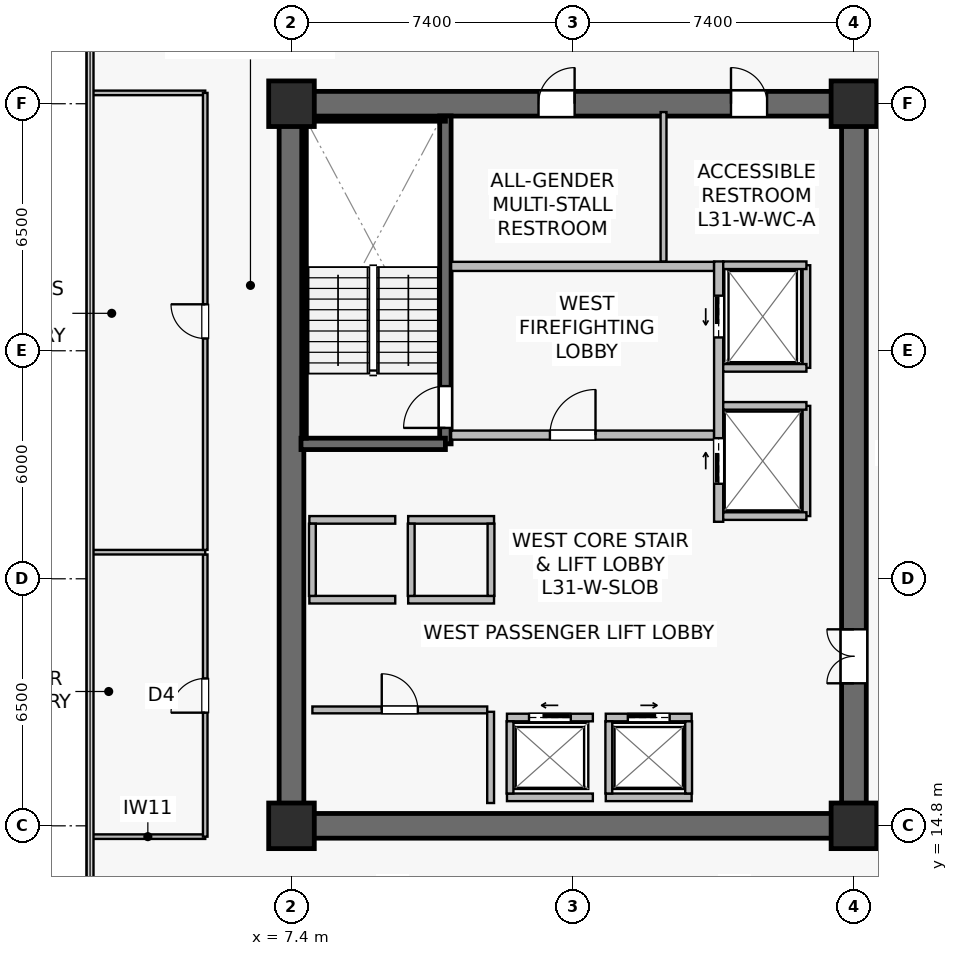
"""IFC4 building model, lengths in metres.
Left out: names, types, materials, properties, quantities, classifications, styles, units other than length and angle.
Written with IfcOpenShell. Run it as: python <this file> out.ifc"""

import sys

from ifc_helpers import new_model, si_unit, direction, frame, frame_2d, origin, origin_2d, place, context, subcontext, project, spatial, rectangle, extrude, source, transform, mapped, element, fill, save


model = new_model("IFC4")
c1 = context("Model", 3, precision=1e-05, world=origin(), true_north=direction((0.0, 1.0)))
c2 = subcontext(c1, "Body", "Model", "MODEL_VIEW")
j1 = project(units=[si_unit("LENGTHUNIT", "METRE"), si_unit("PLANEANGLEUNIT", "RADIAN")], contexts=[c1])
p1 = place(None, origin())
s1 = spatial("IfcSite", under=j1, at=p1, CompositionType="ELEMENT")
p2 = place(p1, origin())
s2 = spatial("IfcBuilding", under=s1, at=p2, CompositionType="ELEMENT")
p3 = place(p2, frame((0.0, 0.0, 129.7)))
s3 = spatial("IfcBuildingStorey", under=s2, at=p3, CompositionType="ELEMENT", Elevation=129.7)
p4 = place(p3, frame((7.075, 14.8, 0.0), z_axis=(0.0, 0.0, 1.0), x_axis=(1.0, 0.0, 0.0)))
e1 = element("IfcWall", 1, at=p4, inside=s3, PredefinedType="SHEAR", context=c2, shape_type="SweptSolid", body=[
    extrude(rectangle(XDim=15.45, YDim=0.65, at=frame_2d((7.725, 0.0))), origin(), (0.0, 0.0, 1.0), 3.79),
])
p5 = place(p3, frame((7.075, 33.8, 0.0), z_axis=(0.0, 0.0, 1.0), x_axis=(1.0, 0.0, 0.0)))
e2 = element("IfcWall", 2, at=p5, inside=s3, PredefinedType="SHEAR", context=c2, shape_type="SweptSolid", body=[
    extrude(rectangle(XDim=15.45, YDim=0.65, at=frame_2d((7.725, 0.0))), origin(), (0.0, 0.0, 1.0), 3.79),
])
p6 = place(p5, frame((6.825, 0.0, 0.0)))
e3 = element("IfcOpeningElement", 3, at=p6, cuts=e2, PredefinedType="OPENING", context=c2, shape_type="SweptSolid", body=[
    extrude(rectangle(XDim=0.95, YDim=2.15, at=frame_2d((0.475, 1.075))), frame((0.0, 0.335, 0.0), z_axis=(0.0, -1.0, 0.0), x_axis=(1.0, 0.0, 0.0)), (0.0, 0.0, 1.0), 0.67),
])
p7 = place(p5, frame((11.89, 0.0, 0.0)))
e4 = element("IfcOpeningElement", 4, at=p7, cuts=e2, PredefinedType="OPENING", context=c2, shape_type="SweptSolid", body=[
    extrude(rectangle(XDim=0.95, YDim=2.15, at=frame_2d((0.475, 1.075))), frame((0.0, 0.335, 0.0), z_axis=(0.0, -1.0, 0.0), x_axis=(1.0, 0.0, 0.0)), (0.0, 0.0, 1.0), 0.67),
])
p8 = place(p3, frame((7.4, 15.125, 0.0), z_axis=(0.0, 0.0, 1.0), x_axis=(0.0, 1.0, 0.0)))
e5 = element("IfcWall", 5, at=p8, inside=s3, PredefinedType="SHEAR", context=c2, shape_type="SweptSolid", body=[
    extrude(rectangle(XDim=18.35, YDim=0.65, at=frame_2d((9.175, 0.0))), origin(), (0.0, 0.0, 1.0), 3.79),
])
p9 = place(p3, frame((22.2, 15.125, 0.0), z_axis=(0.0, 0.0, 1.0), x_axis=(0.0, 1.0, 0.0)))
e6 = element("IfcWall", 6, at=p9, inside=s3, PredefinedType="SHEAR", context=c2, shape_type="SweptSolid", body=[
    extrude(rectangle(XDim=18.35, YDim=0.65, at=frame_2d((9.175, 0.0))), origin(), (0.0, 0.0, 1.0), 3.79),
])
p10 = place(p9, frame((3.425, 0.0, 0.0)))
e7 = element("IfcOpeningElement", 7, at=p10, cuts=e6, PredefinedType="OPENING", context=c2, shape_type="SweptSolid", body=[
    extrude(rectangle(XDim=1.42, YDim=2.2, at=frame_2d((0.71, 1.1))), frame((0.0, 0.335, 0.0), z_axis=(0.0, -1.0, 0.0), x_axis=(1.0, 0.0, 0.0)), (0.0, 0.0, 1.0), 0.67),
])
p11 = place(p3, frame((11.45, 24.85, 0.0), z_axis=(0.0, 0.0, 1.0), x_axis=(0.0, 1.0, 0.0)))
e8 = element("IfcWall", 8, at=p11, inside=s3, PredefinedType="SHEAR", context=c2, shape_type="SweptSolid", body=[
    extrude(rectangle(XDim=8.63, YDim=0.3, at=frame_2d((4.315, 0.0))), origin(), (0.0, 0.0, 1.0), 3.79),
])
p12 = place(p11, frame((0.42, 0.0, 0.0)))
e9 = element("IfcOpeningElement", 9, at=p12, cuts=e8, PredefinedType="OPENING", context=c2, shape_type="SweptSolid", body=[
    extrude(rectangle(XDim=1.1, YDim=2.15, at=frame_2d((0.55, 1.075))), frame((0.0, 0.16, 0.0), z_axis=(0.0, -1.0, 0.0), x_axis=(1.0, 0.0, 0.0)), (0.0, 0.0, 1.0), 0.32),
])
p13 = place(p3, frame((7.65, 24.85, 0.0), z_axis=(0.0, 0.0, 1.0), x_axis=(1.0, 0.0, 0.0)))
e10 = element("IfcWall", 10, at=p13, inside=s3, PredefinedType="SHEAR", context=c2, shape_type="SweptSolid", body=[
    extrude(rectangle(XDim=3.8, YDim=0.3, at=frame_2d((1.9, 0.0))), origin(), (0.0, 0.0, 1.0), 3.79),
])
p14 = place(p3, frame((7.73, 33.4, 0.0), z_axis=(0.0, 0.0, 1.0), x_axis=(1.0, 0.0, 0.0)))
e11 = element("IfcWall", 11, at=p14, inside=s3, PredefinedType="SOLIDWALL", context=c2, shape_type="SweptSolid", body=[
    extrude(rectangle(XDim=3.72, YDim=0.12, at=frame_2d((1.86, 0.0))), origin(), (0.0, 0.0, 1.0), 3.79),
])
p15 = place(p3, frame((7.73, 25.0, 0.0), z_axis=(0.0, 0.0, 1.0), x_axis=(0.0, 1.0, 0.0)))
e12 = element("IfcWall", 12, at=p15, inside=s3, PredefinedType="SOLIDWALL", context=c2, shape_type="SweptSolid", body=[
    extrude(rectangle(XDim=8.32, YDim=0.12, at=frame_2d((4.16, 0.0))), origin(), (0.0, 0.0, 1.0), 3.79),
])
m1 = source(origin(), c2, "Body", "SweptSolid", [
    extrude(rectangle(XDim=1.2, YDim=1.2, at=origin_2d()), origin(), (0.0, 0.0, 1.0), 4.1),
])
for number, where, z_axis, x_axis in (
    (13, (7.4, 14.8, 0.0), (0.0, 0.0, 1.0), (1.0, 0.0, 0.0)),
    (14, (22.2, 14.8, 0.0), (0.0, 0.0, 1.0), (1.0, 0.0, 0.0)),
    (15, (7.4, 33.8, 0.0), (0.0, 0.0, 1.0), (1.0, 0.0, 0.0)),
    (16, (22.2, 33.8, 0.0), (0.0, 0.0, 1.0), (1.0, 0.0, 0.0)),
):
    element("IfcColumn", number, at=place(p3, frame(where, z_axis=z_axis, x_axis=x_axis)), inside=s3, PredefinedType="COLUMN", context=c2, shape_type="MappedRepresentation", body=[
        mapped(m1, transform((0.0, 0.0, 0.0), scale=1.0)),
    ])
p16 = place(p3, frame((11.6, 25.08, 0.0), z_axis=(0.0, 0.0, 1.0), x_axis=(1.0, 0.0, 0.0)))
e17 = element("IfcWall", 17, at=p16, inside=s3, PredefinedType="SOLIDWALL", context=c2, shape_type="SweptSolid", body=[
    extrude(rectangle(XDim=6.92, YDim=0.24, at=frame_2d((3.46, 0.0))), origin(), (0.0, 0.0, 1.0), 3.125),
])
p17 = place(p16, frame((2.6, 0.0, 0.0)))
e18 = element("IfcOpeningElement", 18, at=p17, cuts=e17, PredefinedType="OPENING", context=c2, shape_type="SweptSolid", body=[
    extrude(rectangle(XDim=1.2, YDim=2.16, at=frame_2d((0.6, 1.08))), frame((0.0, 0.13, 0.0), z_axis=(0.0, -1.0, 0.0), x_axis=(1.0, 0.0, 0.0)), (0.0, 0.0, 1.0), 0.26),
])
p18 = place(p3, frame((11.6, 29.52, 0.0), z_axis=(0.0, 0.0, 1.0), x_axis=(1.0, 0.0, 0.0)))
e19 = element("IfcWall", 19, at=p18, inside=s3, PredefinedType="SOLIDWALL", context=c2, shape_type="SweptSolid", body=[
    extrude(rectangle(XDim=6.92, YDim=0.24, at=frame_2d((3.46, 0.0))), origin(), (0.0, 0.0, 1.0), 3.125),
])
p19 = place(p3, frame((18.64, 22.8, 0.0), z_axis=(0.0, 0.0, 1.0), x_axis=(0.0, 1.0, 0.0)))
e20 = element("IfcWall", 20, at=p19, inside=s3, PredefinedType="SOLIDWALL", context=c2, shape_type="SweptSolid", body=[
    extrude(rectangle(XDim=6.85, YDim=0.24, at=frame_2d((3.425, 0.0))), origin(), (0.0, 0.0, 1.0), 2.875),
])
p20 = place(p19, frame((4.85, 0.0, 0.0)))
e21 = element("IfcOpeningElement", 21, at=p20, cuts=e20, PredefinedType="OPENING", context=c2, shape_type="SweptSolid", body=[
    extrude(rectangle(XDim=1.1, YDim=2.22, at=frame_2d((0.55, 1.11))), frame((0.0, 0.13, 0.0), z_axis=(0.0, -1.0, 0.0), x_axis=(1.0, 0.0, 0.0)), (0.0, 0.0, 1.0), 0.26),
])
p21 = place(p19, frame((1.0, 0.0, 0.0)))
e22 = element("IfcOpeningElement", 22, at=p21, cuts=e20, PredefinedType="OPENING", context=c2, shape_type="SweptSolid", body=[
    extrude(rectangle(XDim=1.2, YDim=2.22, at=frame_2d((0.6, 1.11))), frame((0.0, 0.13, 0.0), z_axis=(0.0, -1.0, 0.0), x_axis=(1.0, 0.0, 0.0)), (0.0, 0.0, 1.0), 0.26),
])
p22 = place(p3, frame((13.07, 17.65, 0.0), z_axis=(0.0, 0.0, 1.0), x_axis=(1.0, 0.0, 0.0)))
e23 = element("IfcWall", 23, at=p22, inside=s3, PredefinedType="SOLIDWALL", context=c2, shape_type="SweptSolid", body=[
    extrude(rectangle(XDim=2.26, YDim=0.2, at=frame_2d((1.13, 0.0))), origin(), (0.0, 0.0, 1.0), 3.125),
])
p23 = place(p22, frame((0.58, 0.0, 0.0)))
e24 = element("IfcOpeningElement", 24, at=p23, cuts=e23, PredefinedType="OPENING", context=c2, shape_type="SweptSolid", body=[
    extrude(rectangle(XDim=1.1, YDim=2.22, at=frame_2d((0.55, 1.11))), frame((0.0, 0.11, 0.0), z_axis=(0.0, -1.0, 0.0), x_axis=(1.0, 0.0, 0.0)), (0.0, 0.0, 1.0), 0.22),
])
p24 = place(p3, frame((13.07, 15.55, 0.0), z_axis=(0.0, 0.0, 1.0), x_axis=(1.0, 0.0, 0.0)))
e25 = element("IfcWall", 25, at=p24, inside=s3, PredefinedType="SOLIDWALL", context=c2, shape_type="SweptSolid", body=[
    extrude(rectangle(XDim=2.26, YDim=0.2, at=frame_2d((1.13, 0.0))), origin(), (0.0, 0.0, 1.0), 3.125),
])
p25 = place(p3, frame((13.15, 15.65, 0.0), z_axis=(0.0, 0.0, 1.0), x_axis=(0.0, 1.0, 0.0)))
e26 = element("IfcWall", 26, at=p25, inside=s3, PredefinedType="SOLIDWALL", context=c2, shape_type="SweptSolid", body=[
    extrude(rectangle(XDim=1.9, YDim=0.18, at=frame_2d((0.95, 0.0))), origin(), (0.0, 0.0, 1.0), 3.79),
])
p26 = place(p3, frame((15.67, 17.65, 0.0), z_axis=(0.0, 0.0, 1.0), x_axis=(1.0, 0.0, 0.0)))
e27 = element("IfcWall", 27, at=p26, inside=s3, PredefinedType="SOLIDWALL", context=c2, shape_type="SweptSolid", body=[
    extrude(rectangle(XDim=2.26, YDim=0.2, at=frame_2d((1.13, 0.0))), origin(), (0.0, 0.0, 1.0), 3.79),
])
p27 = place(p26, frame((0.58, 0.0, 0.0)))
e28 = element("IfcOpeningElement", 28, at=p27, cuts=e27, PredefinedType="OPENING", context=c2, shape_type="SweptSolid", body=[
    extrude(rectangle(XDim=1.1, YDim=2.22, at=frame_2d((0.55, 1.11))), frame((0.0, 0.11, 0.0), z_axis=(0.0, -1.0, 0.0), x_axis=(1.0, 0.0, 0.0)), (0.0, 0.0, 1.0), 0.22),
])
p28 = place(p3, frame((15.67, 15.55, 0.0), z_axis=(0.0, 0.0, 1.0), x_axis=(1.0, 0.0, 0.0)))
e29 = element("IfcWall", 29, at=p28, inside=s3, PredefinedType="SOLIDWALL", context=c2, shape_type="SweptSolid", body=[
    extrude(rectangle(XDim=2.26, YDim=0.2, at=frame_2d((1.13, 0.0))), origin(), (0.0, 0.0, 1.0), 3.79),
])
for number, where, z_axis, x_axis in (
    (30, (15.75, 15.65, 0.0), (0.0, 0.0, 1.0), (0.0, 1.0, 0.0)),
    (31, (17.85, 15.65, 0.0), (0.0, 0.0, 1.0), (0.0, 1.0, 0.0)),
):
    element("IfcWall", number, at=place(p3, frame(where, z_axis=z_axis, x_axis=x_axis)), inside=s3, PredefinedType="SOLIDWALL", context=c2, shape_type="SweptSolid", body=[
        extrude(rectangle(XDim=1.9, YDim=0.18, at=frame_2d((0.95, 0.0))), origin(), (0.0, 0.0, 1.0), 3.79),
    ])
for number, where, z_axis, x_axis in (
    (32, (7.87, 20.75, 0.0), (0.0, 0.0, 1.0), (1.0, 0.0, 0.0)),
    (33, (7.87, 22.85, 0.0), (0.0, 0.0, 1.0), (1.0, 0.0, 0.0)),
):
    element("IfcWall", number, at=place(p3, frame(where, z_axis=z_axis, x_axis=x_axis)), inside=s3, PredefinedType="SOLIDWALL", context=c2, shape_type="SweptSolid", body=[
        extrude(rectangle(XDim=2.26, YDim=0.2, at=frame_2d((1.13, 0.0))), origin(), (0.0, 0.0, 1.0), 3.79),
    ])
p29 = place(p3, frame((7.95, 20.85, 0.0), z_axis=(0.0, 0.0, 1.0), x_axis=(0.0, 1.0, 0.0)))
e34 = element("IfcWall", 34, at=p29, inside=s3, PredefinedType="SOLIDWALL", context=c2, shape_type="SweptSolid", body=[
    extrude(rectangle(XDim=1.9, YDim=0.18, at=frame_2d((0.95, 0.0))), origin(), (0.0, 0.0, 1.0), 3.79),
])
for number, where, z_axis, x_axis in (
    (35, (10.47, 20.75, 0.0), (0.0, 0.0, 1.0), (1.0, 0.0, 0.0)),
    (36, (10.47, 22.85, 0.0), (0.0, 0.0, 1.0), (1.0, 0.0, 0.0)),
):
    element("IfcWall", number, at=place(p3, frame(where, z_axis=z_axis, x_axis=x_axis)), inside=s3, PredefinedType="SOLIDWALL", context=c2, shape_type="SweptSolid", body=[
        extrude(rectangle(XDim=2.26, YDim=0.2, at=frame_2d((1.13, 0.0))), origin(), (0.0, 0.0, 1.0), 3.79),
    ])
for number, where, z_axis, x_axis in (
    (37, (10.55, 20.85, 0.0), (0.0, 0.0, 1.0), (0.0, 1.0, 0.0)),
    (38, (12.65, 20.85, 0.0), (0.0, 0.0, 1.0), (0.0, 1.0, 0.0)),
):
    element("IfcWall", number, at=place(p3, frame(where, z_axis=z_axis, x_axis=x_axis)), inside=s3, PredefinedType="SOLIDWALL", context=c2, shape_type="SweptSolid", body=[
        extrude(rectangle(XDim=1.9, YDim=0.18, at=frame_2d((0.95, 0.0))), origin(), (0.0, 0.0, 1.0), 3.79),
    ])
p30 = place(p3, frame((20.95, 26.85, 0.0), z_axis=(0.0, 0.0, 1.0), x_axis=(0.0, 1.0, 0.0)))
e39 = element("IfcWall", 39, at=p30, inside=s3, PredefinedType="SOLIDWALL", context=c2, shape_type="SweptSolid", body=[
    extrude(rectangle(XDim=2.7, YDim=0.2, at=frame_2d((1.35, 0.0))), origin(), (0.0, 0.0, 1.0), 3.79),
])
p31 = place(p3, frame((18.76, 29.55, 0.0), z_axis=(0.0, 0.0, 1.0), x_axis=(1.0, 0.0, 0.0)))
e40 = element("IfcWall", 40, at=p31, inside=s3, PredefinedType="SOLIDWALL", context=c2, shape_type="SweptSolid", body=[
    extrude(rectangle(XDim=2.19, YDim=0.2, at=frame_2d((1.095, 0.0))), origin(), (0.0, 0.0, 1.0), 3.79),
])
p32 = place(p3, frame((18.76, 26.85, 0.0), z_axis=(0.0, 0.0, 1.0), x_axis=(1.0, 0.0, 0.0)))
e41 = element("IfcWall", 41, at=p32, inside=s3, PredefinedType="SOLIDWALL", context=c2, shape_type="SweptSolid", body=[
    extrude(rectangle(XDim=2.19, YDim=0.2, at=frame_2d((1.095, 0.0))), origin(), (0.0, 0.0, 1.0), 3.187),
])
p33 = place(p3, frame((20.95, 22.95, 0.0), z_axis=(0.0, 0.0, 1.0), x_axis=(0.0, 1.0, 0.0)))
e42 = element("IfcWall", 42, at=p33, inside=s3, PredefinedType="SOLIDWALL", context=c2, shape_type="SweptSolid", body=[
    extrude(rectangle(XDim=2.9, YDim=0.2, at=frame_2d((1.45, 0.0))), origin(), (0.0, 0.0, 1.0), 2.875),
])
for number, where, z_axis, x_axis in (
    (43, (18.76, 25.85, 0.0), (0.0, 0.0, 1.0), (1.0, 0.0, 0.0)),
    (44, (18.76, 22.95, 0.0), (0.0, 0.0, 1.0), (1.0, 0.0, 0.0)),
):
    element("IfcWall", number, at=place(p3, frame(where, z_axis=z_axis, x_axis=x_axis)), inside=s3, PredefinedType="SOLIDWALL", context=c2, shape_type="SweptSolid", body=[
        extrude(rectangle(XDim=2.19, YDim=0.2, at=frame_2d((1.095, 0.0))), origin(), (0.0, 0.0, 1.0), 3.79),
    ])
p34 = place(p3, frame((7.95, 17.85, 0.0), z_axis=(0.0, 0.0, 1.0), x_axis=(1.0, 0.0, 0.0)))
e45 = element("IfcWall", 45, at=p34, inside=s3, PredefinedType="SOLIDWALL", context=c2, shape_type="SweptSolid", body=[
    extrude(rectangle(XDim=4.6, YDim=0.18, at=frame_2d((2.3, 0.0))), origin(), (0.0, 0.0, 1.0), 3.79),
])
p35 = place(p34, frame((1.825, 0.0, 0.0)))
e46 = element("IfcOpeningElement", 46, at=p35, cuts=e45, PredefinedType="OPENING", context=c2, shape_type="SweptSolid", body=[
    extrude(rectangle(XDim=0.95, YDim=2.15, at=frame_2d((0.475, 1.075))), frame((0.0, 0.1, 0.0), z_axis=(0.0, -1.0, 0.0), x_axis=(1.0, 0.0, 0.0)), (0.0, 0.0, 1.0), 0.2),
])
p36 = place(p3, frame((12.64, 15.4, 0.0), z_axis=(0.0, 0.0, 1.0), x_axis=(0.0, 1.0, 0.0)))
e47 = element("IfcWall", 47, at=p36, inside=s3, PredefinedType="SOLIDWALL", context=c2, shape_type="SweptSolid", body=[
    extrude(rectangle(XDim=2.4, YDim=0.18, at=frame_2d((1.2, 0.0))), origin(), (0.0, 0.0, 1.0), 3.79),
])
p37 = place(p3, frame((17.19, 29.65, 0.0), z_axis=(0.0, 0.0, 1.0), x_axis=(0.0, 1.0, 0.0)))
e48 = element("IfcWall", 48, at=p37, inside=s3, PredefinedType="PLUMBINGWALL", context=c2, shape_type="SweptSolid", body=[
    extrude(rectangle(XDim=3.93, YDim=0.155, at=frame_2d((1.965, 0.0))), origin(), (0.0, 0.0, 1.0), 3.79),
])
for number, where, z_axis, x_axis in (
    (49, (2.11, 14.515, 0.0), (0.0, 0.0, 1.0), (1.0, 0.0, 0.0)),
    (50, (2.11, 34.085, 0.0), (0.0, 0.0, 1.0), (1.0, 0.0, 0.0)),
):
    element("IfcWall", number, at=place(p3, frame(where, z_axis=z_axis, x_axis=x_axis)), inside=s3, PredefinedType="PARTITIONING", context=c2, shape_type="SweptSolid", body=[
        extrude(rectangle(XDim=3.02, YDim=0.12, at=frame_2d((1.51, 0.0))), origin(), (0.0, 0.0, 1.0), 3.79),
    ])
p38 = place(p3, frame((5.13, 14.515, 0.0), z_axis=(0.0, 0.0, 1.0), x_axis=(0.0, 1.0, 0.0)))
e51 = element("IfcWall", 51, at=p38, inside=s3, PredefinedType="PARTITIONING", context=c2, shape_type="SweptSolid", body=[
    extrude(rectangle(XDim=7.425, YDim=0.12, at=frame_2d((3.712, 0.0))), origin(), (0.0, 0.0, 1.0), 3.79),
])
p39 = place(p38, frame((3.262, 0.0, 0.0)))
e52 = element("IfcOpeningElement", 52, at=p39, cuts=e51, PredefinedType="OPENING", context=c2, shape_type="SweptSolid", body=[
    extrude(rectangle(XDim=0.9, YDim=2.1, at=frame_2d((0.45, 1.05))), frame((0.0, 0.07, 0.0), z_axis=(0.0, -1.0, 0.0), x_axis=(1.0, 0.0, 0.0)), (0.0, 0.0, 1.0), 0.14),
])
p40 = place(p3, frame((2.11, 22.0, 0.0), z_axis=(0.0, 0.0, 1.0), x_axis=(1.0, 0.0, 0.0)))
e53 = element("IfcWall", 53, at=p40, inside=s3, PredefinedType="PARTITIONING", context=c2, shape_type="SweptSolid", body=[
    extrude(rectangle(XDim=3.02, YDim=0.12, at=frame_2d((1.51, 0.0))), origin(), (0.0, 0.0, 1.0), 3.79),
])
p41 = place(p3, frame((5.13, 22.06, 0.0), z_axis=(0.0, 0.0, 1.0), x_axis=(0.0, 1.0, 0.0)))
e54 = element("IfcWall", 54, at=p41, inside=s3, PredefinedType="PARTITIONING", context=c2, shape_type="SweptSolid", body=[
    extrude(rectangle(XDim=12.025, YDim=0.12, at=frame_2d((6.012, 0.0))), origin(), (0.0, 0.0, 1.0), 3.79),
])
p42 = place(p41, frame((5.562, 0.0, 0.0)))
e55 = element("IfcOpeningElement", 55, at=p42, cuts=e54, PredefinedType="OPENING", context=c2, shape_type="SweptSolid", body=[
    extrude(rectangle(XDim=0.9, YDim=2.1, at=frame_2d((0.45, 1.05))), frame((0.0, 0.07, 0.0), z_axis=(0.0, -1.0, 0.0), x_axis=(1.0, 0.0, 0.0)), (0.0, 0.0, 1.0), 0.14),
])
m2 = source(origin(), c2, "Body", "SweptSolid", [
    extrude(rectangle(XDim=1.1, YDim=2.15, at=frame_2d((0.55, 1.075))), frame((0.0, 0.025, 0.0), z_axis=(0.0, -1.0, 0.0), x_axis=(1.0, 0.0, 0.0)), (0.0, 0.0, 1.0), 0.05),
])
p43 = place(p12, origin())
e56 = element("IfcDoor", 56, at=p43, inside=s3, OperationType="SINGLE_SWING_LEFT", PredefinedType="DOOR", context=c2, shape_type="MappedRepresentation", body=[
    mapped(m2, transform((0.0, 0.0, 0.0), scale=1.0)),
])
fill(e9, e56)
m3 = source(origin(), c2, "Body", "SweptSolid", [
    extrude(rectangle(XDim=1.2, YDim=2.16, at=frame_2d((0.6, 1.08))), frame((0.0, 0.025, 0.0), z_axis=(0.0, -1.0, 0.0), x_axis=(1.0, 0.0, 0.0)), (0.0, 0.0, 1.0), 0.05),
])
p44 = place(p17, origin())
e57 = element("IfcDoor", 57, at=p44, inside=s3, OperationType="SINGLE_SWING_RIGHT", PredefinedType="DOOR", context=c2, shape_type="MappedRepresentation", body=[
    mapped(m3, transform((0.0, 0.0, 0.0), scale=1.0)),
])
fill(e18, e57)
m4 = source(origin(), c2, "Body", "SweptSolid", [
    extrude(rectangle(XDim=1.1, YDim=2.22, at=frame_2d((0.55, 1.11))), frame((0.0, 0.025, 0.0), z_axis=(0.0, -1.0, 0.0), x_axis=(1.0, 0.0, 0.0)), (0.0, 0.0, 1.0), 0.05),
])
p45 = place(p23, origin())
e58 = element("IfcDoor", 58, at=p45, inside=s3, OperationType="SLIDING_TO_LEFT", PredefinedType="USERDEFINED", context=c2, shape_type="MappedRepresentation", body=[
    mapped(m4, transform((0.0, 0.0, 0.0), scale=1.0)),
])
fill(e24, e58)
p46 = place(p27, origin())
e59 = element("IfcDoor", 59, at=p46, inside=s3, OperationType="SLIDING_TO_RIGHT", PredefinedType="USERDEFINED", context=c2, shape_type="MappedRepresentation", body=[
    mapped(m4, transform((0.0, 0.0, 0.0), scale=1.0)),
])
fill(e28, e59)
p47 = place(p20, origin())
e60 = element("IfcDoor", 60, at=p47, inside=s3, OperationType="SLIDING_TO_LEFT", PredefinedType="USERDEFINED", context=c2, shape_type="MappedRepresentation", body=[
    mapped(m4, transform((0.0, 0.0, 0.0), scale=1.0)),
])
fill(e21, e60)
m5 = source(origin(), c2, "Body", "SweptSolid", [
    extrude(rectangle(XDim=1.2, YDim=2.22, at=frame_2d((0.6, 1.11))), frame((0.0, 0.025, 0.0), z_axis=(0.0, -1.0, 0.0), x_axis=(1.0, 0.0, 0.0)), (0.0, 0.0, 1.0), 0.05),
])
p48 = place(p21, origin())
e61 = element("IfcDoor", 61, at=p48, inside=s3, OperationType="SLIDING_TO_RIGHT", PredefinedType="USERDEFINED", context=c2, shape_type="MappedRepresentation", body=[
    mapped(m5, transform((0.0, 0.0, 0.0), scale=1.0)),
])
fill(e22, e61)
m6 = source(origin(), c2, "Body", "SweptSolid", [
    extrude(rectangle(XDim=0.95, YDim=2.15, at=frame_2d((0.475, 1.075))), frame((0.0, 0.025, 0.0), z_axis=(0.0, -1.0, 0.0), x_axis=(1.0, 0.0, 0.0)), (0.0, 0.0, 1.0), 0.05),
])
p49 = place(p35, origin())
e62 = element("IfcDoor", 62, at=p49, inside=s3, OperationType="SINGLE_SWING_LEFT", PredefinedType="DOOR", context=c2, shape_type="MappedRepresentation", body=[
    mapped(m6, transform((0.0, 0.0, 0.0), scale=1.0)),
])
fill(e46, e62)
m7 = source(origin(), c2, "Body", "SweptSolid", [
    extrude(rectangle(XDim=1.42, YDim=2.2, at=frame_2d((0.71, 1.1))), frame((0.0, 0.025, 0.0), z_axis=(0.0, -1.0, 0.0), x_axis=(1.0, 0.0, 0.0)), (0.0, 0.0, 1.0), 0.05),
])
p50 = place(p10, origin())
e63 = element("IfcDoor", 63, at=p50, inside=s3, OperationType="DOUBLE_DOOR_SINGLE_SWING", PredefinedType="DOOR", context=c2, shape_type="MappedRepresentation", body=[
    mapped(m7, transform((0.0, 0.0, 0.0), scale=1.0)),
])
fill(e7, e63)
p51 = place(p6, origin())
e64 = element("IfcDoor", 64, at=p51, inside=s3, OperationType="SINGLE_SWING_RIGHT", PredefinedType="DOOR", context=c2, shape_type="MappedRepresentation", body=[
    mapped(m6, transform((0.0, 0.0, 0.0), scale=1.0)),
])
fill(e3, e64)
p52 = place(p7, origin())
e65 = element("IfcDoor", 65, at=p52, inside=s3, OperationType="SINGLE_SWING_LEFT", PredefinedType="DOOR", context=c2, shape_type="MappedRepresentation", body=[
    mapped(m6, transform((0.0, 0.0, 0.0), scale=1.0)),
])
fill(e4, e65)
m8 = source(origin(), c2, "Body", "SweptSolid", [
    extrude(rectangle(XDim=0.9, YDim=2.1, at=frame_2d((0.45, 1.05))), frame((0.0, 0.025, 0.0), z_axis=(0.0, -1.0, 0.0), x_axis=(1.0, 0.0, 0.0)), (0.0, 0.0, 1.0), 0.05),
])
p53 = place(p39, origin())
e66 = element("IfcDoor", 66, at=p53, inside=s3, OperationType="SINGLE_SWING_LEFT", PredefinedType="DOOR", context=c2, shape_type="MappedRepresentation", body=[
    mapped(m8, transform((0.0, 0.0, 0.0), scale=1.0)),
])
fill(e52, e66)
p54 = place(p42, origin())
e67 = element("IfcDoor", 67, at=p54, inside=s3, OperationType="SINGLE_SWING_RIGHT", PredefinedType="DOOR", context=c2, shape_type="MappedRepresentation", body=[
    mapped(m8, transform((0.0, 0.0, 0.0), scale=1.0)),
])
fill(e55, e67)
save(model, sys.argv[1])
